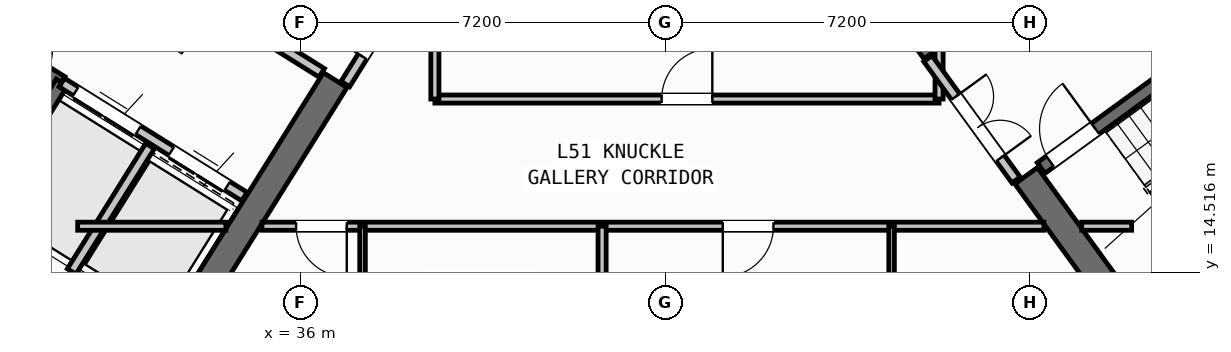
"""IFC4 building model, lengths in metres.
Left out: names, types, materials, properties, quantities, classifications, styles, units other than length and angle.
Written with IfcOpenShell. Run it as: python <this file> out.ifc"""

import sys

from ifc_helpers import new_model, si_unit, direction, frame, frame_2d, origin, place, context, subcontext, project, spatial, rectangle, extrude, source, transform, mapped, element, fill, save


model = new_model("IFC4")
c1 = context("Model", 3, precision=1e-05, world=origin(), true_north=direction((0.0, 1.0)))
c2 = subcontext(c1, "Body", "Model", "MODEL_VIEW")
j1 = project(units=[si_unit("LENGTHUNIT", "METRE"), si_unit("PLANEANGLEUNIT", "RADIAN")], contexts=[c1])
p1 = place(None, origin())
s1 = spatial("IfcSite", under=j1, at=p1, CompositionType="ELEMENT")
p2 = place(p1, origin())
s2 = spatial("IfcBuilding", under=s1, at=p2, CompositionType="ELEMENT")
p3 = place(p2, frame((0.0, 0.0, 204.0)))
s3 = spatial("IfcBuildingStorey", under=s2, at=p3, CompositionType="ELEMENT", Elevation=204.0)
p4 = place(p3, frame((33.366, 12.477, 0.0), z_axis=(0.0, 0.0, 1.0), x_axis=(-0.848047359947, 0.529920442413, 0.0)))
e1 = element("IfcWall", 1, at=p4, inside=s3, PredefinedType="SHEAR", context=c2, shape_type="SweptSolid", body=[
    extrude(rectangle(XDim=13.14, YDim=0.55, at=frame_2d((6.57, 0.0))), origin(), (0.0, 0.0, 1.0), 3.35),
])
p5 = place(p3, frame((36.683, 18.304, 0.0), z_axis=(0.0, 0.0, 1.0), x_axis=(-0.529896466841, -0.848062341122, 0.0)))
e2 = element("IfcWall", 2, at=p5, inside=s3, PredefinedType="SHEAR", context=c2, shape_type="SweptSolid", body=[
    extrude(rectangle(XDim=6.425, YDim=0.55, at=frame_2d((3.212, 0.0))), origin(), (0.0, 0.0, 1.0), 3.35),
])
p6 = place(p3, frame((52.359, 13.14, 0.0), z_axis=(0.0, 0.0, 1.0), x_axis=(0.809014896919, 0.587788139183, 0.0)))
e3 = element("IfcWall", 3, at=p6, inside=s3, PredefinedType="SHEAR", context=c2, shape_type="SweptSolid", body=[
    extrude(rectangle(XDim=12.34, YDim=0.55, at=frame_2d((6.17, 0.0))), origin(), (0.0, 0.0, 1.0), 3.35),
])
p7 = place(p3, frame((52.42, 13.524, 0.0), z_axis=(0.0, 0.0, 1.0), x_axis=(-0.587802113096, 0.809004744015, 0.0)))
e4 = element("IfcWall", 4, at=p7, inside=s3, PredefinedType="SHEAR", context=c2, shape_type="SweptSolid", body=[
    extrude(rectangle(XDim=3.575, YDim=0.55, at=frame_2d((1.788, 0.0))), origin(), (0.0, 0.0, 1.0), 3.35),
])
p8 = place(p3, frame((48.526, 18.884, 0.0), z_axis=(0.0, 0.0, 1.0), x_axis=(-0.587764933797, 0.809031756236, 0.0)))
e5 = element("IfcWall", 5, at=p8, inside=s3, PredefinedType="SHEAR", context=c2, shape_type="SweptSolid", body=[
    extrude(rectangle(XDim=6.425, YDim=0.55, at=frame_2d((3.212, 0.0))), origin(), (0.0, 0.0, 1.0), 3.35),
])
p9 = place(p3, frame((31.76, 12.183, 0.0), z_axis=(0.0, 0.0, 1.0), x_axis=(-0.848047074256, 0.529920899612, 0.0)))
e6 = element("IfcWall", 6, at=p9, inside=s3, PredefinedType="STANDARD", context=c2, shape_type="SweptSolid", body=[
    extrude(rectangle(XDim=30.652, YDim=0.32, at=frame_2d((15.326, 0.0))), origin(), (0.0, 0.0, 1.0), 3.35),
])
p10 = place(p9, frame((15.166, 0.0, 0.0)))
e7 = element("IfcOpeningElement", 7, at=p10, cuts=e6, PredefinedType="OPENING", context=c2, shape_type="SweptSolid", body=[
    extrude(rectangle(XDim=1.2, YDim=2.15, at=frame_2d((0.6, 1.075))), frame((0.0, 0.17, 0.0), z_axis=(0.0, -1.0, 0.0), x_axis=(1.0, 0.0, 0.0)), (0.0, 0.0, 1.0), 0.34),
])
p11 = place(p9, frame((2.24, 0.0, 0.9)))
e8 = element("IfcOpeningElement", 8, at=p11, cuts=e6, PredefinedType="OPENING", context=c2, shape_type="SweptSolid", body=[
    extrude(rectangle(XDim=1.65, YDim=1.45, at=frame_2d((0.825, 0.725))), frame((0.0, 0.17, 0.0), z_axis=(0.0, -1.0, 0.0), x_axis=(1.0, 0.0, 0.0)), (0.0, 0.0, 1.0), 0.34),
])
p12 = place(p9, frame((7.469, 0.0, 0.9)))
e9 = element("IfcOpeningElement", 9, at=p12, cuts=e6, PredefinedType="OPENING", context=c2, shape_type="SweptSolid", body=[
    extrude(rectangle(XDim=1.65, YDim=1.45, at=frame_2d((0.825, 0.725))), frame((0.0, 0.17, 0.0), z_axis=(0.0, -1.0, 0.0), x_axis=(1.0, 0.0, 0.0)), (0.0, 0.0, 1.0), 0.34),
])
p13 = place(p9, frame((12.623, 0.0, 1.0)))
e10 = element("IfcOpeningElement", 10, at=p13, cuts=e6, PredefinedType="OPENING", context=c2, shape_type="SweptSolid", body=[
    extrude(rectangle(XDim=0.9, YDim=1.25, at=frame_2d((0.45, 0.625))), frame((0.0, 0.17, 0.0), z_axis=(0.0, -1.0, 0.0), x_axis=(1.0, 0.0, 0.0)), (0.0, 0.0, 1.0), 0.34),
])
p14 = place(p9, frame((19.556, 0.0, 1.0)))
e11 = element("IfcOpeningElement", 11, at=p14, cuts=e6, PredefinedType="OPENING", context=c2, shape_type="SweptSolid", body=[
    extrude(rectangle(XDim=0.9, YDim=1.25, at=frame_2d((0.45, 0.625))), frame((0.0, 0.17, 0.0), z_axis=(0.0, -1.0, 0.0), x_axis=(1.0, 0.0, 0.0)), (0.0, 0.0, 1.0), 0.34),
])
p15 = place(p9, frame((21.95, 0.0, 1.0)))
e12 = element("IfcOpeningElement", 12, at=p15, cuts=e6, PredefinedType="OPENING", context=c2, shape_type="SweptSolid", body=[
    extrude(rectangle(XDim=0.9, YDim=1.25, at=frame_2d((0.45, 0.625))), frame((0.0, 0.17, 0.0), z_axis=(0.0, -1.0, 0.0), x_axis=(1.0, 0.0, 0.0)), (0.0, 0.0, 1.0), 0.34),
])
p16 = place(p9, frame((26.983, 0.0, 0.9)))
e13 = element("IfcOpeningElement", 13, at=p16, cuts=e6, PredefinedType="OPENING", context=c2, shape_type="SweptSolid", body=[
    extrude(rectangle(XDim=1.35, YDim=1.45, at=frame_2d((0.675, 0.725))), frame((0.0, 0.17, 0.0), z_axis=(0.0, -1.0, 0.0), x_axis=(1.0, 0.0, 0.0)), (0.0, 0.0, 1.0), 0.34),
])
p17 = place(p3, frame((31.28, 18.261, 0.0), z_axis=(0.0, 0.0, 1.0), x_axis=(-0.848051618787, 0.529913626805, 0.0)))
e14 = element("IfcWall", 14, at=p17, inside=s3, PredefinedType="SHEAR", context=c2, shape_type="SweptSolid", body=[
    extrude(rectangle(XDim=7.46, YDim=0.26, at=frame_2d((3.73, 0.0))), origin(), (0.0, 0.0, 1.0), 3.35),
])
p18 = place(p17, frame((0.36, 0.0, 0.0)))
e15 = element("IfcOpeningElement", 15, at=p18, cuts=e14, PredefinedType="OPENING", context=c2, shape_type="SweptSolid", body=[
    extrude(rectangle(XDim=0.86, YDim=2.05, at=frame_2d((0.43, 1.025))), frame((0.0, 0.14, 0.0), z_axis=(0.0, -1.0, 0.0), x_axis=(1.0, 0.0, 0.0)), (0.0, 0.0, 1.0), 0.28),
])
p19 = place(p3, frame((31.288, 18.256, 0.0), z_axis=(0.0, 0.0, 1.0), x_axis=(-0.529943379326, -0.848033026897, 0.0)))
e16 = element("IfcWall", 16, at=p19, inside=s3, PredefinedType="SHEAR", context=c2, shape_type="SweptSolid", body=[
    extrude(rectangle(XDim=3.16, YDim=0.26, at=frame_2d((1.58, 0.0))), origin(), (0.0, 0.0, 1.0), 3.35),
])
p20 = place(p3, frame((34.891, 16.005, 0.0), z_axis=(0.0, 0.0, 1.0), x_axis=(-0.848062873452, 0.529895614884, 0.0)))
e17 = element("IfcWall", 17, at=p20, inside=s3, PredefinedType="STANDARD", context=c2, shape_type="SweptSolid", body=[
    extrude(rectangle(XDim=4.248, YDim=0.2, at=frame_2d((2.124, 0.0))), origin(), (0.0, 0.0, 1.0), 3.34),
])
p21 = place(p20, frame((0.398, 0.0, 0.0)))
e18 = element("IfcOpeningElement", 18, at=p21, cuts=e17, PredefinedType="OPENING", context=c2, shape_type="SweptSolid", body=[
    extrude(rectangle(XDim=1.3, YDim=2.2, at=frame_2d((0.65, 1.1))), frame((0.0, 0.11, 0.0), z_axis=(0.0, -1.0, 0.0), x_axis=(1.0, 0.0, 0.0)), (0.0, 0.0, 1.0), 0.22),
])
p22 = place(p20, frame((2.473, 0.0, 0.0)))
e19 = element("IfcOpeningElement", 19, at=p22, cuts=e17, PredefinedType="OPENING", context=c2, shape_type="SweptSolid", body=[
    extrude(rectangle(XDim=1.45, YDim=2.25, at=frame_2d((0.725, 1.125))), frame((0.0, 0.11, 0.0), z_axis=(0.0, -1.0, 0.0), x_axis=(1.0, 0.0, 0.0)), (0.0, 0.0, 1.0), 0.22),
])
p23 = place(p3, frame((36.417, 18.447, 0.0), z_axis=(0.0, 0.0, 1.0), x_axis=(-0.848064879198, 0.529892404805, 0.0)))
e20 = element("IfcWall", 20, at=p23, inside=s3, PredefinedType="STANDARD", context=c2, shape_type="SweptSolid", body=[
    extrude(rectangle(XDim=5.768, YDim=0.2, at=frame_2d((2.884, 0.0))), origin(), (0.0, 0.0, 1.0), 3.34),
])
p24 = place(p23, frame((2.548, 0.0, 0.0)))
e21 = element("IfcOpeningElement", 21, at=p24, cuts=e20, PredefinedType="OPENING", context=c2, shape_type="SweptSolid", body=[
    extrude(rectangle(XDim=1.15, YDim=2.1, at=frame_2d((0.575, 1.05))), frame((0.0, 0.11, 0.0), z_axis=(0.0, -1.0, 0.0), x_axis=(1.0, 0.0, 0.0)), (0.0, 0.0, 1.0), 0.22),
])
p25 = place(p3, frame((33.029, 17.003, 0.0), z_axis=(0.0, 0.0, 1.0), x_axis=(-0.529916267533, -0.848049968695, 0.0)))
e22 = element("IfcWall", 22, at=p25, inside=s3, PredefinedType="STANDARD", context=c2, shape_type="SweptSolid", body=[
    extrude(rectangle(XDim=2.92, YDim=0.2, at=frame_2d((1.46, 0.0))), origin(), (0.0, 0.0, 1.0), 3.34),
])
p26 = place(p3, frame((52.472, 14.013, 0.0), z_axis=(0.0, 0.0, 1.0), x_axis=(0.809028366311, 0.587769599847, 0.0)))
e23 = element("IfcWall", 23, at=p26, inside=s3, PredefinedType="SHEAR", context=c2, shape_type="SweptSolid", body=[
    extrude(rectangle(XDim=7.33, YDim=0.26, at=frame_2d((3.665, 0.0))), origin(), (0.0, 0.0, 1.0), 3.35),
])
p27 = place(p3, frame((50.615, 16.57, 0.0), z_axis=(0.0, 0.0, 1.0), x_axis=(0.809028366311, 0.587769599847, 0.0)))
e24 = element("IfcWall", 24, at=p27, inside=s3, PredefinedType="SHEAR", context=c2, shape_type="SweptSolid", body=[
    extrude(rectangle(XDim=7.33, YDim=0.26, at=frame_2d((3.665, 0.0))), origin(), (0.0, 0.0, 1.0), 3.35),
])
p28 = place(p27, frame((0.22, 0.0, 0.0)))
e25 = element("IfcOpeningElement", 25, at=p28, cuts=e24, PredefinedType="OPENING", context=c2, shape_type="SweptSolid", body=[
    extrude(rectangle(XDim=1.1, YDim=2.1, at=frame_2d((0.55, 1.05))), frame((0.0, 0.14, 0.0), z_axis=(0.0, -1.0, 0.0), x_axis=(1.0, 0.0, 0.0)), (0.0, 0.0, 1.0), 0.28),
])
p29 = place(p3, frame((38.451, 20.737, 0.0), z_axis=(0.0, 0.0, 1.0), x_axis=(-0.529924799939, -0.848044637038, 0.0)))
e26 = element("IfcWall", 26, at=p29, inside=s3, PredefinedType="STANDARD", context=c2, shape_type="SweptSolid", body=[
    extrude(rectangle(XDim=2.96, YDim=0.2, at=frame_2d((1.48, 0.0))), origin(), (0.0, 0.0, 1.0), 3.34),
])
p30 = place(p29, frame((1.46, 0.0, 0.0)))
e27 = element("IfcOpeningElement", 27, at=p30, cuts=e26, PredefinedType="OPENING", context=c2, shape_type="SweptSolid", body=[
    extrude(rectangle(XDim=0.86, YDim=2.05, at=frame_2d((0.43, 1.025))), frame((0.0, 0.11, 0.0), z_axis=(0.0, -1.0, 0.0), x_axis=(1.0, 0.0, 0.0)), (0.0, 0.0, 1.0), 0.22),
])
p31 = place(p3, frame((31.6, 15.42, 0.0), z_axis=(0.0, 0.0, 1.0), x_axis=(1.0, 0.0, 0.0)))
e28 = element("IfcWall", 28, at=p31, inside=s3, PredefinedType="PARTITIONING", context=c2, shape_type="SweptSolid", body=[
    extrude(rectangle(XDim=2.925, YDim=0.16, at=frame_2d((1.462, 0.0))), origin(), (0.0, 0.0, 1.0), 3.34),
])
p32 = place(p3, frame((35.237, 15.42, 0.0), z_axis=(0.0, 0.0, 1.0), x_axis=(1.0, 0.0, 0.0)))
e29 = element("IfcWall", 29, at=p32, inside=s3, PredefinedType="PARTITIONING", context=c2, shape_type="SweptSolid", body=[
    extrude(rectangle(XDim=15.432, YDim=0.16, at=frame_2d((7.716, 0.0))), origin(), (0.0, 0.0, 1.0), 3.34),
])
p33 = place(p32, frame((0.674, 0.0, 0.0)))
e30 = element("IfcOpeningElement", 30, at=p33, cuts=e29, PredefinedType="OPENING", context=c2, shape_type="SweptSolid", body=[
    extrude(rectangle(XDim=1.0, YDim=2.1, at=frame_2d((0.5, 1.05))), frame((0.0, 0.09, 0.0), z_axis=(0.0, -1.0, 0.0), x_axis=(1.0, 0.0, 0.0)), (0.0, 0.0, 1.0), 0.18),
])
p34 = place(p32, frame((9.094, 0.0, 0.0)))
e31 = element("IfcOpeningElement", 31, at=p34, cuts=e29, PredefinedType="OPENING", context=c2, shape_type="SweptSolid", body=[
    extrude(rectangle(XDim=1.0, YDim=2.1, at=frame_2d((0.5, 1.05))), frame((0.0, 0.09, 0.0), z_axis=(0.0, -1.0, 0.0), x_axis=(1.0, 0.0, 0.0)), (0.0, 0.0, 1.0), 0.18),
])
p35 = place(p3, frame((51.416, 15.42, 0.0), z_axis=(0.0, 0.0, 1.0), x_axis=(1.0, 0.0, 0.0)))
e32 = element("IfcWall", 32, at=p35, inside=s3, PredefinedType="PARTITIONING", context=c2, shape_type="SweptSolid", body=[
    extrude(rectangle(XDim=0.984, YDim=0.16, at=frame_2d((0.492, 0.0))), origin(), (0.0, 0.0, 1.0), 3.34),
])
p36 = place(p3, frame((38.65, 17.93, 0.0), z_axis=(0.0, 0.0, 1.0), x_axis=(1.0, 0.0, 0.0)))
e33 = element("IfcWall", 33, at=p36, inside=s3, PredefinedType="PARTITIONING", context=c2, shape_type="SweptSolid", body=[
    extrude(rectangle(XDim=9.95, YDim=0.16, at=frame_2d((4.975, 0.0))), origin(), (0.0, 0.0, 1.0), 3.34),
])
p37 = place(p36, frame((4.475, 0.0, 0.0)))
e34 = element("IfcOpeningElement", 34, at=p37, cuts=e33, PredefinedType="OPENING", context=c2, shape_type="SweptSolid", body=[
    extrude(rectangle(XDim=1.0, YDim=2.1, at=frame_2d((0.5, 1.05))), frame((0.0, 0.09, 0.0), z_axis=(0.0, -1.0, 0.0), x_axis=(1.0, 0.0, 0.0)), (0.0, 0.0, 1.0), 0.18),
])
p38 = place(p3, frame((38.65, 17.93, 0.0), z_axis=(0.0, 0.0, 1.0), x_axis=(0.0, 1.0, 0.0)))
e35 = element("IfcWall", 35, at=p38, inside=s3, PredefinedType="PARTITIONING", context=c2, shape_type="SweptSolid", body=[
    extrude(rectangle(XDim=2.951, YDim=0.16, at=frame_2d((1.476, 0.0))), origin(), (0.0, 0.0, 1.0), 3.34),
])
p39 = place(p3, frame((48.6, 17.93, 0.0), z_axis=(0.0, 0.0, 1.0), x_axis=(0.0, 1.0, 0.0)))
e36 = element("IfcWall", 36, at=p39, inside=s3, PredefinedType="PARTITIONING", context=c2, shape_type="SweptSolid", body=[
    extrude(rectangle(XDim=0.993, YDim=0.16, at=frame_2d((0.496, 0.0))), origin(), (0.0, 0.0, 1.0), 3.34),
])
p40 = place(p3, frame((50.119, 16.333, 0.0), z_axis=(0.0, 0.0, 1.0), x_axis=(-0.587749856981, 0.809042709391, 0.0)))
e37 = element("IfcWall", 37, at=p40, inside=s3, PredefinedType="STANDARD", context=c2, shape_type="SweptSolid", body=[
    extrude(rectangle(XDim=2.96, YDim=0.2, at=frame_2d((1.48, 0.0))), origin(), (0.0, 0.0, 1.0), 3.34),
])
p41 = place(p40, frame((0.53, 0.0, 0.0)))
e38 = element("IfcOpeningElement", 38, at=p41, cuts=e37, PredefinedType="OPENING", context=c2, shape_type="SweptSolid", body=[
    extrude(rectangle(XDim=1.5, YDim=2.15, at=frame_2d((0.75, 1.075))), frame((0.0, 0.11, 0.0), z_axis=(0.0, -1.0, 0.0), x_axis=(1.0, 0.0, 0.0)), (0.0, 0.0, 1.0), 0.22),
])
p42 = place(p3, frame((41.95, 1.96, 0.0), z_axis=(0.0, 0.0, 1.0), x_axis=(0.0, 1.0, 0.0)))
e39 = element("IfcWall", 39, at=p42, inside=s3, PredefinedType="PARTITIONING", context=c2, shape_type="SweptSolid", body=[
    extrude(rectangle(XDim=13.46, YDim=0.16, at=frame_2d((6.73, 0.0))), origin(), (0.0, 0.0, 1.0), 3.34),
])
p43 = place(p3, frame((37.222, 1.96, 0.0), z_axis=(0.0, 0.0, 1.0), x_axis=(0.0, 1.0, 0.0)))
e40 = element("IfcWall", 40, at=p43, inside=s3, PredefinedType="PARTITIONING", context=c2, shape_type="SweptSolid", body=[
    extrude(rectangle(XDim=13.46, YDim=0.11, at=frame_2d((6.73, 0.0))), origin(), (0.0, 0.0, 1.0), 3.34),
])
p44 = place(p43, frame((5.2, 0.0, 0.0)))
e41 = element("IfcOpeningElement", 41, at=p44, cuts=e40, PredefinedType="OPENING", context=c2, shape_type="SweptSolid", body=[
    extrude(rectangle(XDim=0.92, YDim=2.08, at=frame_2d((0.46, 1.04))), frame((0.0, 0.065, 0.0), z_axis=(0.0, -1.0, 0.0), x_axis=(1.0, 0.0, 0.0)), (0.0, 0.0, 1.0), 0.13),
])
p45 = place(p43, frame((10.45, 0.0, 0.0)))
e42 = element("IfcOpeningElement", 42, at=p45, cuts=e40, PredefinedType="OPENING", context=c2, shape_type="SweptSolid", body=[
    extrude(rectangle(XDim=0.88, YDim=2.08, at=frame_2d((0.44, 1.04))), frame((0.0, 0.065, 0.0), z_axis=(0.0, -1.0, 0.0), x_axis=(1.0, 0.0, 0.0)), (0.0, 0.0, 1.0), 0.13),
])
p46 = place(p3, frame((47.663, 1.96, 0.0), z_axis=(0.0, 0.0, 1.0), x_axis=(0.0, 1.0, 0.0)))
e43 = element("IfcWall", 43, at=p46, inside=s3, PredefinedType="PARTITIONING", context=c2, shape_type="SweptSolid", body=[
    extrude(rectangle(XDim=13.46, YDim=0.11, at=frame_2d((6.73, 0.0))), origin(), (0.0, 0.0, 1.0), 3.34),
])
p47 = place(p46, frame((6.3, 0.0, 0.0)))
e44 = element("IfcOpeningElement", 44, at=p47, cuts=e43, PredefinedType="OPENING", context=c2, shape_type="SweptSolid", body=[
    extrude(rectangle(XDim=0.92, YDim=2.08, at=frame_2d((0.46, 1.04))), frame((0.0, 0.065, 0.0), z_axis=(0.0, -1.0, 0.0), x_axis=(1.0, 0.0, 0.0)), (0.0, 0.0, 1.0), 0.13),
])
p48 = place(p46, frame((11.1, 0.0, 0.0)))
e45 = element("IfcOpeningElement", 45, at=p48, cuts=e43, PredefinedType="OPENING", context=c2, shape_type="SweptSolid", body=[
    extrude(rectangle(XDim=0.88, YDim=2.08, at=frame_2d((0.44, 1.04))), frame((0.0, 0.065, 0.0), z_axis=(0.0, -1.0, 0.0), x_axis=(1.0, 0.0, 0.0)), (0.0, 0.0, 1.0), 0.13),
])
m1 = source(origin(), c2, "Body", "SweptSolid", [
    extrude(rectangle(XDim=1.3, YDim=2.2, at=frame_2d((0.65, 1.1))), frame((0.0, 0.025, 0.0), z_axis=(0.0, -1.0, 0.0), x_axis=(1.0, 0.0, 0.0)), (0.0, 0.0, 1.0), 0.05),
])
p49 = place(p21, origin())
e46 = element("IfcDoor", 46, at=p49, inside=s3, OperationType="DOUBLE_DOOR_SLIDING", PredefinedType="DOOR", context=c2, shape_type="MappedRepresentation", body=[
    mapped(m1, transform((0.0, 0.0, 0.0), scale=1.0)),
])
fill(e18, e46)
m2 = source(origin(), c2, "Body", "SweptSolid", [
    extrude(rectangle(XDim=1.45, YDim=2.25, at=frame_2d((0.725, 1.125))), frame((0.0, 0.025, 0.0), z_axis=(0.0, -1.0, 0.0), x_axis=(1.0, 0.0, 0.0)), (0.0, 0.0, 1.0), 0.05),
])
p50 = place(p22, origin())
e47 = element("IfcDoor", 47, at=p50, inside=s3, OperationType="DOUBLE_DOOR_SLIDING", PredefinedType="DOOR", context=c2, shape_type="MappedRepresentation", body=[
    mapped(m2, transform((0.0, 0.0, 0.0), scale=1.0)),
])
fill(e19, e47)
m3 = source(origin(), c2, "Body", "SweptSolid", [
    extrude(rectangle(XDim=1.1, YDim=2.1, at=frame_2d((0.55, 1.05))), frame((0.0, 0.025, 0.0), z_axis=(0.0, -1.0, 0.0), x_axis=(1.0, 0.0, 0.0)), (0.0, 0.0, 1.0), 0.05),
])
p51 = place(p28, origin())
e48 = element("IfcDoor", 48, at=p51, inside=s3, OperationType="SINGLE_SWING_RIGHT", PredefinedType="DOOR", context=c2, shape_type="MappedRepresentation", body=[
    mapped(m3, transform((0.0, 0.0, 0.0), scale=1.0)),
])
fill(e25, e48)
m4 = source(origin(), c2, "Body", "SweptSolid", [
    extrude(rectangle(XDim=1.0, YDim=2.1, at=frame_2d((0.5, 1.05))), frame((0.0, 0.025, 0.0), z_axis=(0.0, -1.0, 0.0), x_axis=(1.0, 0.0, 0.0)), (0.0, 0.0, 1.0), 0.05),
])
p52 = place(p37, origin())
e49 = element("IfcDoor", 49, at=p52, inside=s3, OperationType="SINGLE_SWING_RIGHT", PredefinedType="DOOR", context=c2, shape_type="MappedRepresentation", body=[
    mapped(m4, transform((0.0, 0.0, 0.0), scale=1.0)),
])
fill(e34, e49)
m5 = source(origin(), c2, "Body", "SweptSolid", [
    extrude(rectangle(XDim=0.86, YDim=2.05, at=frame_2d((0.43, 1.025))), frame((0.0, 0.025, 0.0), z_axis=(0.0, -1.0, 0.0), x_axis=(1.0, 0.0, 0.0)), (0.0, 0.0, 1.0), 0.05),
])
p53 = place(p30, frame((0.86, 0.0, 0.0), z_axis=(0.0, 0.0, 1.0), x_axis=(-1.0, 0.0, 0.0)))
e50 = element("IfcDoor", 50, at=p53, inside=s3, OperationType="SINGLE_SWING_LEFT", PredefinedType="DOOR", context=c2, shape_type="MappedRepresentation", body=[
    mapped(m5, transform((0.0, 0.0, 0.0), scale=1.0)),
])
fill(e27, e50)
m6 = source(origin(), c2, "Body", "SweptSolid", [
    extrude(rectangle(XDim=1.5, YDim=2.15, at=frame_2d((0.75, 1.075))), frame((0.0, 0.025, 0.0), z_axis=(0.0, -1.0, 0.0), x_axis=(1.0, 0.0, 0.0)), (0.0, 0.0, 1.0), 0.05),
])
p54 = place(p41, frame((1.5, 0.0, 0.0), z_axis=(0.0, 0.0, 1.0), x_axis=(-1.0, 0.0, 0.0)))
e51 = element("IfcDoor", 51, at=p54, inside=s3, OperationType="DOUBLE_DOOR_SINGLE_SWING", PredefinedType="DOOR", context=c2, shape_type="MappedRepresentation", body=[
    mapped(m6, transform((0.0, 0.0, 0.0), scale=1.0)),
])
fill(e38, e51)
p55 = place(p33, frame((1.0, 0.0, 0.0), z_axis=(0.0, 0.0, 1.0), x_axis=(-1.0, 0.0, 0.0)))
e52 = element("IfcDoor", 52, at=p55, inside=s3, OperationType="SINGLE_SWING_LEFT", PredefinedType="DOOR", context=c2, shape_type="MappedRepresentation", body=[
    mapped(m4, transform((0.0, 0.0, 0.0), scale=1.0)),
])
fill(e30, e52)
p56 = place(p34, frame((1.0, 0.0, 0.0), z_axis=(0.0, 0.0, 1.0), x_axis=(-1.0, 0.0, 0.0)))
e53 = element("IfcDoor", 53, at=p56, inside=s3, OperationType="SINGLE_SWING_RIGHT", PredefinedType="DOOR", context=c2, shape_type="MappedRepresentation", body=[
    mapped(m4, transform((0.0, 0.0, 0.0), scale=1.0)),
])
fill(e31, e53)
save(model, sys.argv[1])
